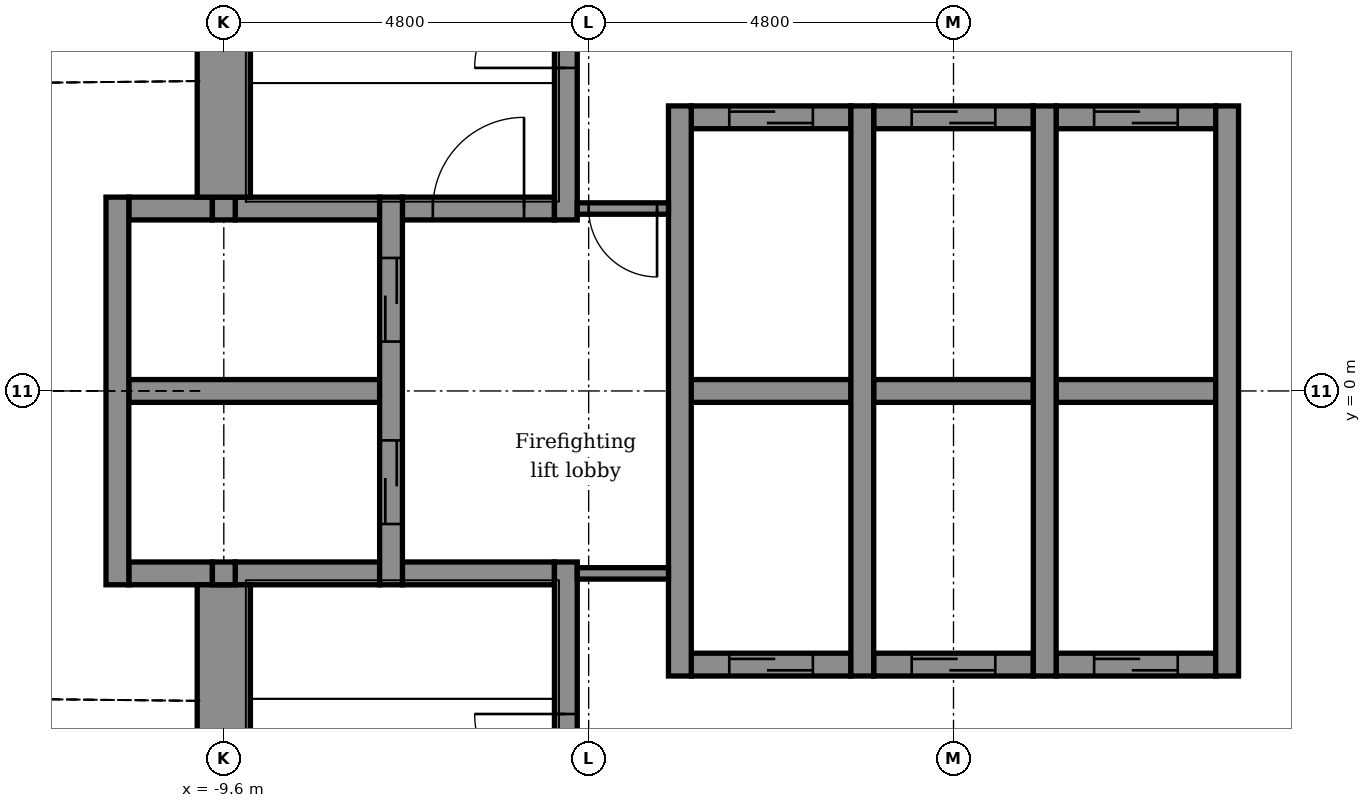
"""IFC4 building model, lengths in metres.
Left out: names, types, materials, properties, quantities, classifications, styles, units other than length and angle.
Written with IfcOpenShell. Run it as: python <this file> out.ifc"""

import sys

from ifc_helpers import new_model, si_unit, direction, frame, frame_2d, origin, place, context, subcontext, project, spatial, rectangle, extrude, element, fill, save


model = new_model("IFC4")
c1 = context("Model", 3, precision=1e-05, world=origin(), true_north=direction((0.0, 1.0)))
c2 = subcontext(c1, "Body", "Model", "MODEL_VIEW")
j1 = project(units=[si_unit("LENGTHUNIT", "METRE"), si_unit("PLANEANGLEUNIT", "RADIAN")], contexts=[c1])
p1 = place(None, origin())
s1 = spatial("IfcSite", under=j1, at=p1, CompositionType="ELEMENT")
p2 = place(p1, origin())
s2 = spatial("IfcBuilding", under=s1, at=p2, CompositionType="ELEMENT")
p3 = place(p2, frame((0.0, 0.0, 216.8)))
s3 = spatial("IfcBuildingStorey", under=s2, at=p3, CompositionType="ELEMENT", Elevation=216.8)
p4 = place(p3, frame((-3.45, -3.6, -0.3), z_axis=(0.0, 0.0, 1.0), x_axis=(1.0, 0.0, 0.0)))
e1 = element("IfcWall", 1, at=p4, inside=s3, PredefinedType="STANDARD", context=c2, shape_type="SweptSolid", body=[
    extrude(rectangle(XDim=2.1, YDim=0.3, at=frame_2d((1.05, 0.0))), origin(), (0.0, 0.0, 1.0), 6.15),
])
p5 = place(p4, frame((0.5, 0.0, 0.3)))
e2 = element("IfcOpeningElement", 2, at=p5, cuts=e1, PredefinedType="OPENING", context=c2, shape_type="SweptSolid", body=[
    extrude(rectangle(XDim=1.1, YDim=2.1, at=frame_2d((0.55, 1.05))), frame((0.0, 0.16, 0.0), z_axis=(0.0, -1.0, 0.0), x_axis=(1.0, 0.0, 0.0)), (0.0, 0.0, 1.0), 0.32),
])
p6 = place(p3, frame((-1.05, -3.6, -0.3), z_axis=(0.0, 0.0, 1.0), x_axis=(1.0, 0.0, 0.0)))
e3 = element("IfcWall", 3, at=p6, inside=s3, PredefinedType="STANDARD", context=c2, shape_type="SweptSolid", body=[
    extrude(rectangle(XDim=2.1, YDim=0.3, at=frame_2d((1.05, 0.0))), origin(), (0.0, 0.0, 1.0), 6.15),
])
p7 = place(p6, frame((0.5, 0.0, 0.3)))
e4 = element("IfcOpeningElement", 4, at=p7, cuts=e3, PredefinedType="OPENING", context=c2, shape_type="SweptSolid", body=[
    extrude(rectangle(XDim=1.1, YDim=2.1, at=frame_2d((0.55, 1.05))), frame((0.0, 0.16, 0.0), z_axis=(0.0, -1.0, 0.0), x_axis=(1.0, 0.0, 0.0)), (0.0, 0.0, 1.0), 0.32),
])
p8 = place(p3, frame((1.35, -3.6, -0.3), z_axis=(0.0, 0.0, 1.0), x_axis=(1.0, 0.0, 0.0)))
e5 = element("IfcWall", 5, at=p8, inside=s3, PredefinedType="STANDARD", context=c2, shape_type="SweptSolid", body=[
    extrude(rectangle(XDim=2.1, YDim=0.3, at=frame_2d((1.05, 0.0))), origin(), (0.0, 0.0, 1.0), 6.15),
])
p9 = place(p8, frame((0.5, 0.0, 0.3)))
e6 = element("IfcOpeningElement", 6, at=p9, cuts=e5, PredefinedType="OPENING", context=c2, shape_type="SweptSolid", body=[
    extrude(rectangle(XDim=1.1, YDim=2.1, at=frame_2d((0.55, 1.05))), frame((0.0, 0.16, 0.0), z_axis=(0.0, -1.0, 0.0), x_axis=(1.0, 0.0, 0.0)), (0.0, 0.0, 1.0), 0.32),
])
p10 = place(p3, frame((-10.85, -2.4, -0.3), z_axis=(0.0, 0.0, 1.0), x_axis=(1.0, 0.0, 0.0)))
e7 = element("IfcWall", 7, at=p10, inside=s3, PredefinedType="STANDARD", context=c2, shape_type="SweptSolid", body=[
    extrude(rectangle(XDim=1.1, YDim=0.3, at=frame_2d((0.55, 0.0))), origin(), (0.0, 0.0, 1.0), 6.15),
])
p11 = place(p3, frame((-9.45, -2.4, -0.3), z_axis=(0.0, 0.0, 1.0), x_axis=(1.0, 0.0, 0.0)))
e8 = element("IfcWall", 8, at=p11, inside=s3, PredefinedType="STANDARD", context=c2, shape_type="SweptSolid", body=[
    extrude(rectangle(XDim=1.9, YDim=0.3, at=frame_2d((0.95, 0.0))), origin(), (0.0, 0.0, 1.0), 6.15),
])
p12 = place(p3, frame((-7.25, -2.4, -0.3), z_axis=(0.0, 0.0, 1.0), x_axis=(1.0, 0.0, 0.0)))
e9 = element("IfcWall", 9, at=p12, inside=s3, PredefinedType="STANDARD", context=c2, shape_type="SweptSolid", body=[
    extrude(rectangle(XDim=2.0, YDim=0.3, at=frame_2d((1.0, 0.0))), origin(), (0.0, 0.0, 1.0), 6.15),
])
p13 = place(p3, frame((-10.85, 0.0, -0.3), z_axis=(0.0, 0.0, 1.0), x_axis=(1.0, 0.0, 0.0)))
e10 = element("IfcWall", 10, at=p13, inside=s3, PredefinedType="STANDARD", context=c2, shape_type="SweptSolid", body=[
    extrude(rectangle(XDim=3.3, YDim=0.3, at=frame_2d((1.65, 0.0))), origin(), (0.0, 0.0, 1.0), 6.15),
])
p14 = place(p3, frame((-3.45, 0.0, -0.3), z_axis=(0.0, 0.0, 1.0), x_axis=(1.0, 0.0, 0.0)))
e11 = element("IfcWall", 11, at=p14, inside=s3, PredefinedType="STANDARD", context=c2, shape_type="SweptSolid", body=[
    extrude(rectangle(XDim=2.1, YDim=0.3, at=frame_2d((1.05, 0.0))), origin(), (0.0, 0.0, 1.0), 6.15),
])
p15 = place(p3, frame((-1.05, 0.0, -0.3), z_axis=(0.0, 0.0, 1.0), x_axis=(1.0, 0.0, 0.0)))
e12 = element("IfcWall", 12, at=p15, inside=s3, PredefinedType="STANDARD", context=c2, shape_type="SweptSolid", body=[
    extrude(rectangle(XDim=2.1, YDim=0.3, at=frame_2d((1.05, 0.0))), origin(), (0.0, 0.0, 1.0), 6.15),
])
p16 = place(p3, frame((1.35, 0.0, -0.3), z_axis=(0.0, 0.0, 1.0), x_axis=(1.0, 0.0, 0.0)))
e13 = element("IfcWall", 13, at=p16, inside=s3, PredefinedType="STANDARD", context=c2, shape_type="SweptSolid", body=[
    extrude(rectangle(XDim=2.1, YDim=0.3, at=frame_2d((1.05, 0.0))), origin(), (0.0, 0.0, 1.0), 6.15),
])
p17 = place(p3, frame((-10.85, 2.4, -0.3), z_axis=(0.0, 0.0, 1.0), x_axis=(1.0, 0.0, 0.0)))
e14 = element("IfcWall", 14, at=p17, inside=s3, PredefinedType="STANDARD", context=c2, shape_type="SweptSolid", body=[
    extrude(rectangle(XDim=1.1, YDim=0.3, at=frame_2d((0.55, 0.0))), origin(), (0.0, 0.0, 1.0), 6.15),
])
p18 = place(p3, frame((-9.45, 2.4, -0.3), z_axis=(0.0, 0.0, 1.0), x_axis=(1.0, 0.0, 0.0)))
e15 = element("IfcWall", 15, at=p18, inside=s3, PredefinedType="STANDARD", context=c2, shape_type="SweptSolid", body=[
    extrude(rectangle(XDim=1.9, YDim=0.3, at=frame_2d((0.95, 0.0))), origin(), (0.0, 0.0, 1.0), 6.15),
])
p19 = place(p3, frame((-7.25, 2.4, -0.3), z_axis=(0.0, 0.0, 1.0), x_axis=(1.0, 0.0, 0.0)))
e16 = element("IfcWall", 16, at=p19, inside=s3, PredefinedType="STANDARD", context=c2, shape_type="SweptSolid", body=[
    extrude(rectangle(XDim=2.0, YDim=0.3, at=frame_2d((1.0, 0.0))), origin(), (0.0, 0.0, 1.0), 6.15),
])
p20 = place(p19, frame((0.4, 0.0, 0.3)))
e17 = element("IfcOpeningElement", 17, at=p20, cuts=e16, PredefinedType="OPENING", context=c2, shape_type="SweptSolid", body=[
    extrude(rectangle(XDim=1.2, YDim=2.1, at=frame_2d((0.6, 1.05))), frame((0.0, 0.16, 0.0), z_axis=(0.0, -1.0, 0.0), x_axis=(1.0, 0.0, 0.0)), (0.0, 0.0, 1.0), 0.32),
])
p21 = place(p3, frame((-3.45, 3.6, -0.3), z_axis=(0.0, 0.0, 1.0), x_axis=(1.0, 0.0, 0.0)))
e18 = element("IfcWall", 18, at=p21, inside=s3, PredefinedType="STANDARD", context=c2, shape_type="SweptSolid", body=[
    extrude(rectangle(XDim=2.1, YDim=0.3, at=frame_2d((1.05, 0.0))), origin(), (0.0, 0.0, 1.0), 6.15),
])
p22 = place(p21, frame((0.5, 0.0, 0.3)))
e19 = element("IfcOpeningElement", 19, at=p22, cuts=e18, PredefinedType="OPENING", context=c2, shape_type="SweptSolid", body=[
    extrude(rectangle(XDim=1.1, YDim=2.1, at=frame_2d((0.55, 1.05))), frame((0.0, 0.16, 0.0), z_axis=(0.0, -1.0, 0.0), x_axis=(1.0, 0.0, 0.0)), (0.0, 0.0, 1.0), 0.32),
])
p23 = place(p3, frame((-1.05, 3.6, -0.3), z_axis=(0.0, 0.0, 1.0), x_axis=(1.0, 0.0, 0.0)))
e20 = element("IfcWall", 20, at=p23, inside=s3, PredefinedType="STANDARD", context=c2, shape_type="SweptSolid", body=[
    extrude(rectangle(XDim=2.1, YDim=0.3, at=frame_2d((1.05, 0.0))), origin(), (0.0, 0.0, 1.0), 6.15),
])
p24 = place(p23, frame((0.5, 0.0, 0.3)))
e21 = element("IfcOpeningElement", 21, at=p24, cuts=e20, PredefinedType="OPENING", context=c2, shape_type="SweptSolid", body=[
    extrude(rectangle(XDim=1.1, YDim=2.1, at=frame_2d((0.55, 1.05))), frame((0.0, 0.16, 0.0), z_axis=(0.0, -1.0, 0.0), x_axis=(1.0, 0.0, 0.0)), (0.0, 0.0, 1.0), 0.32),
])
p25 = place(p3, frame((1.35, 3.6, -0.3), z_axis=(0.0, 0.0, 1.0), x_axis=(1.0, 0.0, 0.0)))
e22 = element("IfcWall", 22, at=p25, inside=s3, PredefinedType="STANDARD", context=c2, shape_type="SweptSolid", body=[
    extrude(rectangle(XDim=2.1, YDim=0.3, at=frame_2d((1.05, 0.0))), origin(), (0.0, 0.0, 1.0), 6.15),
])
p26 = place(p25, frame((0.5, 0.0, 0.3)))
e23 = element("IfcOpeningElement", 23, at=p26, cuts=e22, PredefinedType="OPENING", context=c2, shape_type="SweptSolid", body=[
    extrude(rectangle(XDim=1.1, YDim=2.1, at=frame_2d((0.55, 1.05))), frame((0.0, 0.16, 0.0), z_axis=(0.0, -1.0, 0.0), x_axis=(1.0, 0.0, 0.0)), (0.0, 0.0, 1.0), 0.32),
])
p27 = place(p3, frame((-11.0, -2.55, -0.3), z_axis=(0.0, 0.0, 1.0), x_axis=(0.0, 1.0, 0.0)))
e24 = element("IfcWall", 24, at=p27, inside=s3, PredefinedType="STANDARD", context=c2, shape_type="SweptSolid", body=[
    extrude(rectangle(XDim=5.1, YDim=0.3, at=frame_2d((2.55, 0.0))), origin(), (0.0, 0.0, 1.0), 6.15),
])
p28 = place(p3, frame((-9.6, -10.15, -0.3), z_axis=(0.0, 0.0, 1.0), x_axis=(0.0, 1.0, 0.0)))
e25 = element("IfcWall", 25, at=p28, inside=s3, PredefinedType="SHEAR", context=c2, shape_type="SweptSolid", body=[
    extrude(rectangle(XDim=7.6, YDim=0.7, at=frame_2d((3.8, 0.0))), origin(), (0.0, 0.0, 1.0), 6.15),
])
for number, where, z_axis, x_axis in (
    (26, (-9.6, -2.55, -0.3), (0.0, 0.0, 1.0), (0.0, 1.0, 0.0)),
    (27, (-9.6, 2.25, -0.3), (0.0, 0.0, 1.0), (0.0, 1.0, 0.0)),
):
    element("IfcWall", number, at=place(p3, frame(where, z_axis=z_axis, x_axis=x_axis)), inside=s3, PredefinedType="STANDARD", context=c2, shape_type="SweptSolid", body=[
        extrude(rectangle(XDim=0.3, YDim=0.3, at=frame_2d((0.15, 0.0))), origin(), (0.0, 0.0, 1.0), 6.15),
    ])
p29 = place(p3, frame((-9.6, 2.55, -0.3), z_axis=(0.0, 0.0, 1.0), x_axis=(0.0, 1.0, 0.0)))
e28 = element("IfcWall", 28, at=p29, inside=s3, PredefinedType="SHEAR", context=c2, shape_type="SweptSolid", body=[
    extrude(rectangle(XDim=7.6, YDim=0.7, at=frame_2d((3.8, 0.0))), origin(), (0.0, 0.0, 1.0), 6.15),
])
p30 = place(p3, frame((-7.4, -2.55, -0.3), z_axis=(0.0, 0.0, 1.0), x_axis=(0.0, 1.0, 0.0)))
e29 = element("IfcWall", 29, at=p30, inside=s3, PredefinedType="STANDARD", context=c2, shape_type="SweptSolid", body=[
    extrude(rectangle(XDim=5.1, YDim=0.3, at=frame_2d((2.55, 0.0))), origin(), (0.0, 0.0, 1.0), 6.15),
])
p31 = place(p30, frame((0.8, 0.0, 0.3)))
e30 = element("IfcOpeningElement", 30, at=p31, cuts=e29, PredefinedType="OPENING", context=c2, shape_type="SweptSolid", body=[
    extrude(rectangle(XDim=1.1, YDim=2.1, at=frame_2d((0.55, 1.05))), frame((0.0, 0.16, 0.0), z_axis=(0.0, -1.0, 0.0), x_axis=(1.0, 0.0, 0.0)), (0.0, 0.0, 1.0), 0.32),
])
p32 = place(p30, frame((3.2, 0.0, 0.3)))
e31 = element("IfcOpeningElement", 31, at=p32, cuts=e29, PredefinedType="OPENING", context=c2, shape_type="SweptSolid", body=[
    extrude(rectangle(XDim=1.1, YDim=2.1, at=frame_2d((0.55, 1.05))), frame((0.0, 0.16, 0.0), z_axis=(0.0, -1.0, 0.0), x_axis=(1.0, 0.0, 0.0)), (0.0, 0.0, 1.0), 0.32),
])
p33 = place(p3, frame((-5.1, -9.25, -0.3), z_axis=(0.0, 0.0, 1.0), x_axis=(0.0, 1.0, 0.0)))
e32 = element("IfcWall", 32, at=p33, inside=s3, PredefinedType="STANDARD", context=c2, shape_type="SweptSolid", body=[
    extrude(rectangle(XDim=7.0, YDim=0.3, at=frame_2d((3.5, 0.0))), origin(), (0.0, 0.0, 1.0), 6.15),
])
p34 = place(p33, frame((3.8, 0.0, 0.3)))
e33 = element("IfcOpeningElement", 33, at=p34, cuts=e32, PredefinedType="OPENING", context=c2, shape_type="SweptSolid", body=[
    extrude(rectangle(XDim=1.2, YDim=2.1, at=frame_2d((0.6, 1.05))), frame((0.0, 0.16, 0.0), z_axis=(0.0, -1.0, 0.0), x_axis=(1.0, 0.0, 0.0)), (0.0, 0.0, 1.0), 0.32),
])
p35 = place(p3, frame((-5.1, 2.25, -0.3), z_axis=(0.0, 0.0, 1.0), x_axis=(0.0, 1.0, 0.0)))
e34 = element("IfcWall", 34, at=p35, inside=s3, PredefinedType="STANDARD", context=c2, shape_type="SweptSolid", body=[
    extrude(rectangle(XDim=7.0, YDim=0.3, at=frame_2d((3.5, 0.0))), origin(), (0.0, 0.0, 1.0), 6.15),
])
p36 = place(p35, frame((2.0, 0.0, 0.3)))
e35 = element("IfcOpeningElement", 35, at=p36, cuts=e34, PredefinedType="OPENING", context=c2, shape_type="SweptSolid", body=[
    extrude(rectangle(XDim=1.2, YDim=2.1, at=frame_2d((0.6, 1.05))), frame((0.0, 0.16, 0.0), z_axis=(0.0, -1.0, 0.0), x_axis=(1.0, 0.0, 0.0)), (0.0, 0.0, 1.0), 0.32),
])
for number, where, z_axis, x_axis in (
    (36, (-3.6, -3.75, -0.3), (0.0, 0.0, 1.0), (0.0, 1.0, 0.0)),
    (37, (-1.2, -3.75, -0.3), (0.0, 0.0, 1.0), (0.0, 1.0, 0.0)),
    (38, (1.2, -3.75, -0.3), (0.0, 0.0, 1.0), (0.0, 1.0, 0.0)),
    (39, (3.6, -3.75, -0.3), (0.0, 0.0, 1.0), (0.0, 1.0, 0.0)),
):
    element("IfcWall", number, at=place(p3, frame(where, z_axis=z_axis, x_axis=x_axis)), inside=s3, PredefinedType="STANDARD", context=c2, shape_type="SweptSolid", body=[
        extrude(rectangle(XDim=7.5, YDim=0.3, at=frame_2d((3.75, 0.0))), origin(), (0.0, 0.0, 1.0), 6.15),
    ])
p37 = place(p3, frame((-4.95, 2.4, 0.0), z_axis=(0.0, 0.0, 1.0), x_axis=(1.0, 0.0, 0.0)))
e40 = element("IfcWall", 40, at=p37, inside=s3, PredefinedType="PARTITIONING", context=c2, shape_type="SweptSolid", body=[
    extrude(rectangle(XDim=1.2, YDim=0.15, at=frame_2d((0.6, 0.0))), origin(), (0.0, 0.0, 1.0), 5.85),
])
p38 = place(p37, frame((0.15, 0.0, 0.0)))
e41 = element("IfcOpeningElement", 41, at=p38, cuts=e40, PredefinedType="OPENING", context=c2, shape_type="SweptSolid", body=[
    extrude(rectangle(XDim=0.9, YDim=2.1, at=frame_2d((0.45, 1.05))), frame((0.0, 0.085, 0.0), z_axis=(0.0, -1.0, 0.0), x_axis=(1.0, 0.0, 0.0)), (0.0, 0.0, 1.0), 0.17),
])
p39 = place(p3, frame((-4.95, -2.4, 0.0), z_axis=(0.0, 0.0, 1.0), x_axis=(1.0, 0.0, 0.0)))
e42 = element("IfcWall", 42, at=p39, inside=s3, PredefinedType="PARTITIONING", context=c2, shape_type="SweptSolid", body=[
    extrude(rectangle(XDim=1.2, YDim=0.15, at=frame_2d((0.6, 0.0))), origin(), (0.0, 0.0, 1.0), 5.85),
])
p40 = place(p31, origin())
e43 = element("IfcDoor", 43, at=p40, inside=s3, OperationType="DOUBLE_DOOR_SLIDING", PredefinedType="DOOR", context=c2, shape_type="SweptSolid", body=[
    extrude(rectangle(XDim=1.1, YDim=2.1, at=frame_2d((0.55, 1.05))), frame((0.0, 0.025, 0.0), z_axis=(0.0, -1.0, 0.0), x_axis=(1.0, 0.0, 0.0)), (0.0, 0.0, 1.0), 0.05),
])
fill(e30, e43)
p41 = place(p32, origin())
e44 = element("IfcDoor", 44, at=p41, inside=s3, OperationType="DOUBLE_DOOR_SLIDING", PredefinedType="DOOR", context=c2, shape_type="SweptSolid", body=[
    extrude(rectangle(XDim=1.1, YDim=2.1, at=frame_2d((0.55, 1.05))), frame((0.0, 0.025, 0.0), z_axis=(0.0, -1.0, 0.0), x_axis=(1.0, 0.0, 0.0)), (0.0, 0.0, 1.0), 0.05),
])
fill(e31, e44)
p42 = place(p22, origin())
e45 = element("IfcDoor", 45, at=p42, inside=s3, OperationType="DOUBLE_DOOR_SLIDING", PredefinedType="DOOR", context=c2, shape_type="SweptSolid", body=[
    extrude(rectangle(XDim=1.1, YDim=2.1, at=frame_2d((0.55, 1.05))), frame((0.0, 0.025, 0.0), z_axis=(0.0, -1.0, 0.0), x_axis=(1.0, 0.0, 0.0)), (0.0, 0.0, 1.0), 0.05),
])
fill(e19, e45)
p43 = place(p24, origin())
e46 = element("IfcDoor", 46, at=p43, inside=s3, OperationType="DOUBLE_DOOR_SLIDING", PredefinedType="DOOR", context=c2, shape_type="SweptSolid", body=[
    extrude(rectangle(XDim=1.1, YDim=2.1, at=frame_2d((0.55, 1.05))), frame((0.0, 0.025, 0.0), z_axis=(0.0, -1.0, 0.0), x_axis=(1.0, 0.0, 0.0)), (0.0, 0.0, 1.0), 0.05),
])
fill(e21, e46)
p44 = place(p26, origin())
e47 = element("IfcDoor", 47, at=p44, inside=s3, OperationType="DOUBLE_DOOR_SLIDING", PredefinedType="DOOR", context=c2, shape_type="SweptSolid", body=[
    extrude(rectangle(XDim=1.1, YDim=2.1, at=frame_2d((0.55, 1.05))), frame((0.0, 0.025, 0.0), z_axis=(0.0, -1.0, 0.0), x_axis=(1.0, 0.0, 0.0)), (0.0, 0.0, 1.0), 0.05),
])
fill(e23, e47)
p45 = place(p5, origin())
e48 = element("IfcDoor", 48, at=p45, inside=s3, OperationType="DOUBLE_DOOR_SLIDING", PredefinedType="DOOR", context=c2, shape_type="SweptSolid", body=[
    extrude(rectangle(XDim=1.1, YDim=2.1, at=frame_2d((0.55, 1.05))), frame((0.0, 0.025, 0.0), z_axis=(0.0, -1.0, 0.0), x_axis=(1.0, 0.0, 0.0)), (0.0, 0.0, 1.0), 0.05),
])
fill(e2, e48)
p46 = place(p7, origin())
e49 = element("IfcDoor", 49, at=p46, inside=s3, OperationType="DOUBLE_DOOR_SLIDING", PredefinedType="DOOR", context=c2, shape_type="SweptSolid", body=[
    extrude(rectangle(XDim=1.1, YDim=2.1, at=frame_2d((0.55, 1.05))), frame((0.0, 0.025, 0.0), z_axis=(0.0, -1.0, 0.0), x_axis=(1.0, 0.0, 0.0)), (0.0, 0.0, 1.0), 0.05),
])
fill(e4, e49)
p47 = place(p9, origin())
e50 = element("IfcDoor", 50, at=p47, inside=s3, OperationType="DOUBLE_DOOR_SLIDING", PredefinedType="DOOR", context=c2, shape_type="SweptSolid", body=[
    extrude(rectangle(XDim=1.1, YDim=2.1, at=frame_2d((0.55, 1.05))), frame((0.0, 0.025, 0.0), z_axis=(0.0, -1.0, 0.0), x_axis=(1.0, 0.0, 0.0)), (0.0, 0.0, 1.0), 0.05),
])
fill(e6, e50)
p48 = place(p36, origin())
e51 = element("IfcDoor", 51, at=p48, inside=s3, OperationType="SINGLE_SWING_LEFT", PredefinedType="DOOR", context=c2, shape_type="SweptSolid", body=[
    extrude(rectangle(XDim=1.2, YDim=2.1, at=frame_2d((0.6, 1.05))), frame((0.0, 0.025, 0.0), z_axis=(0.0, -1.0, 0.0), x_axis=(1.0, 0.0, 0.0)), (0.0, 0.0, 1.0), 0.05),
])
fill(e35, e51)
p49 = place(p34, origin())
e52 = element("IfcDoor", 52, at=p49, inside=s3, OperationType="SINGLE_SWING_RIGHT", PredefinedType="DOOR", context=c2, shape_type="SweptSolid", body=[
    extrude(rectangle(XDim=1.2, YDim=2.1, at=frame_2d((0.6, 1.05))), frame((0.0, 0.025, 0.0), z_axis=(0.0, -1.0, 0.0), x_axis=(1.0, 0.0, 0.0)), (0.0, 0.0, 1.0), 0.05),
])
fill(e33, e52)
p50 = place(p38, frame((0.9, 0.0, 0.0), z_axis=(0.0, 0.0, 1.0), x_axis=(-1.0, 0.0, 0.0)))
e53 = element("IfcDoor", 53, at=p50, inside=s3, OperationType="SINGLE_SWING_RIGHT", PredefinedType="DOOR", context=c2, shape_type="SweptSolid", body=[
    extrude(rectangle(XDim=0.9, YDim=2.1, at=frame_2d((0.45, 1.05))), frame((0.0, 0.025, 0.0), z_axis=(0.0, -1.0, 0.0), x_axis=(1.0, 0.0, 0.0)), (0.0, 0.0, 1.0), 0.05),
])
fill(e41, e53)
p51 = place(p20, origin())
e54 = element("IfcDoor", 54, at=p51, inside=s3, OperationType="SINGLE_SWING_RIGHT", PredefinedType="DOOR", context=c2, shape_type="SweptSolid", body=[
    extrude(rectangle(XDim=1.2, YDim=2.1, at=frame_2d((0.6, 1.05))), frame((0.0, 0.025, 0.0), z_axis=(0.0, -1.0, 0.0), x_axis=(1.0, 0.0, 0.0)), (0.0, 0.0, 1.0), 0.05),
])
fill(e17, e54)
save(model, sys.argv[1])
